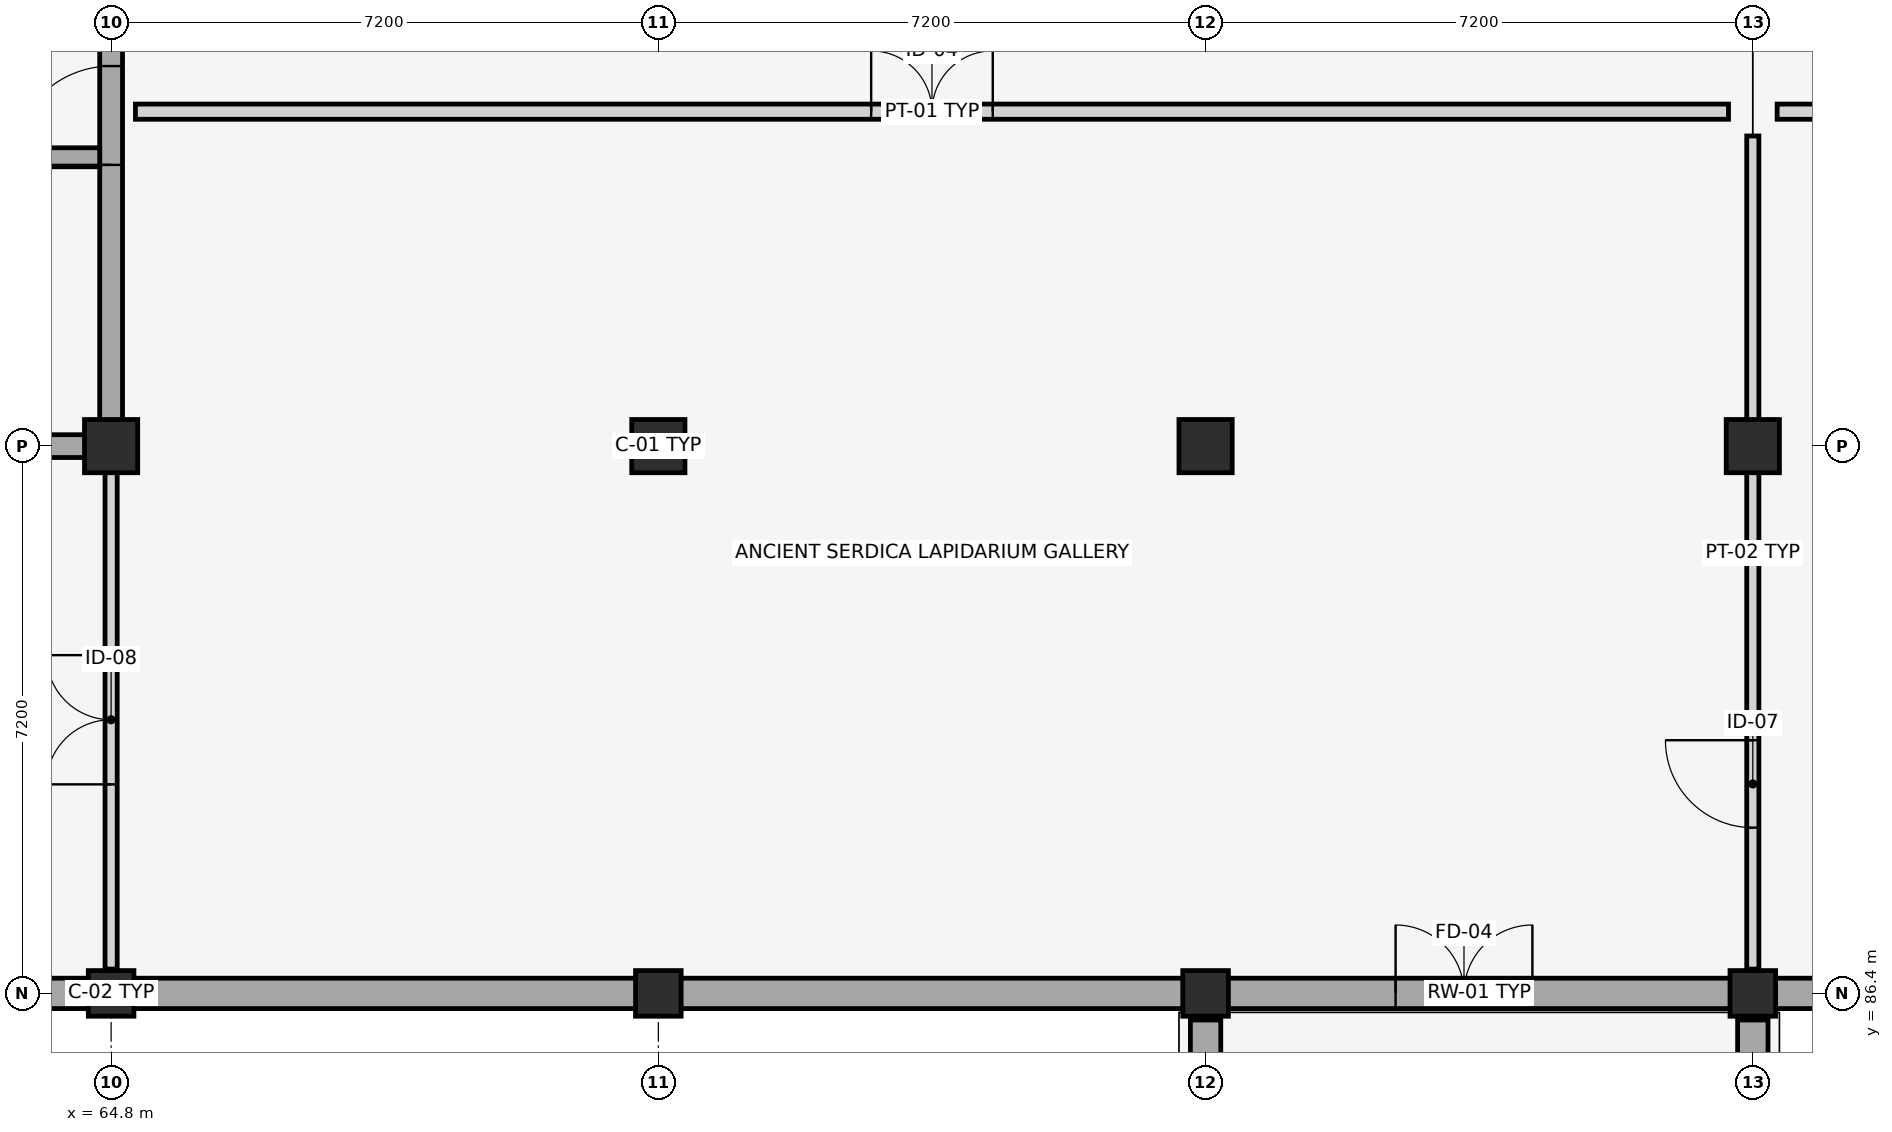
"""IFC4 building model, lengths in metres.
Left out: names, types, materials, properties, quantities, classifications, styles, units other than length and angle.
Written with IfcOpenShell. Run it as: python <this file> out.ifc"""

import sys

from ifc_helpers import new_model, si_unit, direction, frame, frame_2d, origin, origin_2d, place, context, subcontext, project, spatial, rectangle, extrude, element, fill, save


model = new_model("IFC4")
c1 = context("Model", 3, precision=1e-05, world=origin(), true_north=direction((0.0, 1.0)))
c2 = subcontext(c1, "Body", "Model", "MODEL_VIEW")
j1 = project(units=[si_unit("LENGTHUNIT", "METRE"), si_unit("PLANEANGLEUNIT", "RADIAN")], contexts=[c1])
p1 = place(None, origin())
s1 = spatial("IfcSite", under=j1, at=p1, CompositionType="ELEMENT")
p2 = place(p1, origin())
s2 = spatial("IfcBuilding", under=s1, at=p2, CompositionType="ELEMENT")
p3 = place(p2, frame((0.0, 0.0, -4.5)))
s3 = spatial("IfcBuildingStorey", under=s2, at=p3, CompositionType="ELEMENT", Elevation=-4.5)
p4 = place(p3, frame((57.4, 86.4, 0.0), z_axis=(0.0, 0.0, 1.0), x_axis=(1.0, 0.0, 0.0)))
e1 = element("IfcWall", 1, at=p4, inside=s3, PredefinedType="USERDEFINED", context=c2, shape_type="SweptSolid", body=[
    extrude(rectangle(XDim=50.8, YDim=0.4, at=frame_2d((25.4, 0.0))), origin(), (0.0, 0.0, 1.0), 3.67),
])
p5 = place(p4, frame((24.3, 0.0, 0.0)))
e2 = element("IfcOpeningElement", 2, at=p5, cuts=e1, PredefinedType="OPENING", context=c2, shape_type="SweptSolid", body=[
    extrude(rectangle(XDim=1.8, YDim=2.4, at=frame_2d((0.9, 1.2))), frame((0.0, 0.21, 0.0), z_axis=(0.0, -1.0, 0.0), x_axis=(1.0, 0.0, 0.0)), (0.0, 0.0, 1.0), 0.42),
])
p6 = place(p3, frame((64.8, 86.4, -0.45), z_axis=(0.0, 0.0, 1.0), x_axis=(0.0, 1.0, 0.0)))
e3 = element("IfcColumn", 3, at=p6, inside=s3, PredefinedType="COLUMN", context=c2, shape_type="SweptSolid", body=[
    extrude(rectangle(XDim=0.6, YDim=0.6, at=origin_2d()), origin(), (0.0, 0.0, 1.0), 4.95),
])
p7 = place(p3, frame((64.8, 93.6, -0.45), z_axis=(0.0, 0.0, 1.0), x_axis=(1.0, 0.0, 0.0)))
e4 = element("IfcColumn", 4, at=p7, inside=s3, PredefinedType="COLUMN", context=c2, shape_type="SweptSolid", body=[
    extrude(rectangle(XDim=0.7, YDim=0.7, at=origin_2d()), origin(), (0.0, 0.0, 1.0), 4.95),
])
p8 = place(p3, frame((72.0, 86.4, -0.45), z_axis=(0.0, 0.0, 1.0), x_axis=(1.0, 0.0, 0.0)))
e5 = element("IfcColumn", 5, at=p8, inside=s3, PredefinedType="COLUMN", context=c2, shape_type="SweptSolid", body=[
    extrude(rectangle(XDim=0.6, YDim=0.6, at=origin_2d()), origin(), (0.0, 0.0, 1.0), 4.95),
])
p9 = place(p3, frame((72.0, 93.6, -0.45), z_axis=(0.0, 0.0, 1.0), x_axis=(0.0, 1.0, 0.0)))
e6 = element("IfcColumn", 6, at=p9, inside=s3, PredefinedType="COLUMN", context=c2, shape_type="SweptSolid", body=[
    extrude(rectangle(XDim=0.7, YDim=0.7, at=origin_2d()), origin(), (0.0, 0.0, 1.0), 4.95),
])
p10 = place(p3, frame((79.2, 86.4, -0.45), z_axis=(0.0, 0.0, 1.0), x_axis=(0.0, 1.0, 0.0)))
e7 = element("IfcColumn", 7, at=p10, inside=s3, PredefinedType="COLUMN", context=c2, shape_type="SweptSolid", body=[
    extrude(rectangle(XDim=0.6, YDim=0.6, at=origin_2d()), origin(), (0.0, 0.0, 1.0), 4.95),
])
p11 = place(p3, frame((79.2, 93.6, -0.45), z_axis=(0.0, 0.0, 1.0), x_axis=(1.0, 0.0, 0.0)))
e8 = element("IfcColumn", 8, at=p11, inside=s3, PredefinedType="COLUMN", context=c2, shape_type="SweptSolid", body=[
    extrude(rectangle(XDim=0.7, YDim=0.7, at=origin_2d()), origin(), (0.0, 0.0, 1.0), 4.95),
])
p12 = place(p3, frame((86.4, 86.4, -0.45), z_axis=(0.0, 0.0, 1.0), x_axis=(1.0, 0.0, 0.0)))
e9 = element("IfcColumn", 9, at=p12, inside=s3, PredefinedType="COLUMN", context=c2, shape_type="SweptSolid", body=[
    extrude(rectangle(XDim=0.6, YDim=0.6, at=origin_2d()), origin(), (0.0, 0.0, 1.0), 4.95),
])
p13 = place(p3, frame((86.4, 93.6, -0.45), z_axis=(0.0, 0.0, 1.0), x_axis=(0.0, 1.0, 0.0)))
e10 = element("IfcColumn", 10, at=p13, inside=s3, PredefinedType="COLUMN", context=c2, shape_type="SweptSolid", body=[
    extrude(rectangle(XDim=0.7, YDim=0.7, at=origin_2d()), origin(), (0.0, 0.0, 1.0), 4.95),
])
for number, where, z_axis, x_axis in (
    (11, (79.2, 29.15, 0.0), (0.0, 0.0, 1.0), (0.0, 1.0, 0.0)),
    (12, (86.4, 29.15, 0.0), (0.0, 0.0, 1.0), (0.0, 1.0, 0.0)),
):
    element("IfcWall", number, at=place(p3, frame(where, z_axis=z_axis, x_axis=x_axis)), inside=s3, PredefinedType="USERDEFINED", context=c2, shape_type="SweptSolid", body=[
        extrude(rectangle(XDim=56.9, YDim=0.4, at=frame_2d((28.45, 0.0))), origin(), (0.0, 0.0, 1.0), 3.67),
    ])
p14 = place(p3, frame((57.8, 93.6, 0.0), z_axis=(0.0, 0.0, 1.0), x_axis=(1.0, 0.0, 0.0)))
e13 = element("IfcWall", 13, at=p14, inside=s3, PredefinedType="SHEAR", context=c2, shape_type="SweptSolid", body=[
    extrude(rectangle(XDim=7.15, YDim=0.3, at=frame_2d((3.575, 0.0))), origin(), (0.0, 0.0, 1.0), 4.25),
])
p15 = place(p3, frame((64.8, 93.75, 0.0), z_axis=(0.0, 0.0, 1.0), x_axis=(0.0, 1.0, 0.0)))
e14 = element("IfcWall", 14, at=p15, inside=s3, PredefinedType="SHEAR", context=c2, shape_type="SweptSolid", body=[
    extrude(rectangle(XDim=14.1, YDim=0.3, at=frame_2d((7.05, 0.0))), origin(), (0.0, 0.0, 1.0), 4.25),
])
p16 = place(p15, frame((3.55, 0.0, 0.0)))
e15 = element("IfcOpeningElement", 15, at=p16, cuts=e14, PredefinedType="OPENING", context=c2, shape_type="SweptSolid", body=[
    extrude(rectangle(XDim=1.3, YDim=2.2, at=frame_2d((0.65, 1.1))), frame((0.0, 0.16, 0.0), z_axis=(0.0, -1.0, 0.0), x_axis=(1.0, 0.0, 0.0)), (0.0, 0.0, 1.0), 0.32),
])
p17 = place(p15, frame((7.85, 0.0, 0.0)))
e16 = element("IfcOpeningElement", 16, at=p17, cuts=e14, PredefinedType="OPENING", context=c2, shape_type="SweptSolid", body=[
    extrude(rectangle(XDim=1.05, YDim=2.15, at=frame_2d((0.525, 1.075))), frame((0.0, 0.16, 0.0), z_axis=(0.0, -1.0, 0.0), x_axis=(1.0, 0.0, 0.0)), (0.0, 0.0, 1.0), 0.32),
])
p18 = place(p15, frame((10.55, 0.0, 0.0)))
e17 = element("IfcOpeningElement", 17, at=p18, cuts=e14, PredefinedType="OPENING", context=c2, shape_type="SweptSolid", body=[
    extrude(rectangle(XDim=1.0, YDim=2.15, at=frame_2d((0.5, 1.075))), frame((0.0, 0.16, 0.0), z_axis=(0.0, -1.0, 0.0), x_axis=(1.0, 0.0, 0.0)), (0.0, 0.0, 1.0), 0.32),
])
p19 = place(p3, frame((61.275, 97.4, 0.0), z_axis=(0.0, 0.0, 1.0), x_axis=(1.0, 0.0, 0.0)))
e18 = element("IfcWall", 18, at=p19, inside=s3, PredefinedType="SHEAR", context=c2, shape_type="SweptSolid", body=[
    extrude(rectangle(XDim=3.375, YDim=0.25, at=frame_2d((1.688, 0.0))), origin(), (0.0, 0.0, 1.0), 4.25),
])
p20 = place(p3, frame((65.12, 98.0, 0.0), z_axis=(0.0, 0.0, 1.0), x_axis=(1.0, 0.0, 0.0)))
e19 = element("IfcWall", 19, at=p20, inside=s3, PredefinedType="PARTITIONING", context=c2, shape_type="SweptSolid", body=[
    extrude(rectangle(XDim=20.96, YDim=0.2, at=frame_2d((10.48, 0.0))), origin(), (0.0, 0.0, 1.0), 3.45),
])
p21 = place(p20, frame((9.68, 0.0, 0.0)))
e20 = element("IfcOpeningElement", 20, at=p21, cuts=e19, PredefinedType="OPENING", context=c2, shape_type="SweptSolid", body=[
    extrude(rectangle(XDim=1.6, YDim=2.35, at=frame_2d((0.8, 1.175))), frame((0.0, 0.11, 0.0), z_axis=(0.0, -1.0, 0.0), x_axis=(1.0, 0.0, 0.0)), (0.0, 0.0, 1.0), 0.22),
])
p22 = place(p3, frame((86.72, 98.0, 0.0), z_axis=(0.0, 0.0, 1.0), x_axis=(1.0, 0.0, 0.0)))
e21 = element("IfcWall", 21, at=p22, inside=s3, PredefinedType="PARTITIONING", context=c2, shape_type="SweptSolid", body=[
    extrude(rectangle(XDim=13.76, YDim=0.2, at=frame_2d((6.88, 0.0))), origin(), (0.0, 0.0, 1.0), 3.45),
])
p23 = place(p22, frame((1.702, 0.0, 0.0)))
e22 = element("IfcOpeningElement", 22, at=p23, cuts=e21, PredefinedType="OPENING", context=c2, shape_type="SweptSolid", body=[
    extrude(rectangle(XDim=1.6, YDim=2.35, at=frame_2d((0.8, 1.175))), frame((0.0, 0.11, 0.0), z_axis=(0.0, -1.0, 0.0), x_axis=(1.0, 0.0, 0.0)), (0.0, 0.0, 1.0), 0.22),
])
p24 = place(p3, frame((86.4, 86.72, 0.0), z_axis=(0.0, 0.0, 1.0), x_axis=(0.0, 1.0, 0.0)))
e23 = element("IfcWall", 23, at=p24, inside=s3, PredefinedType="PARTITIONING", context=c2, shape_type="SweptSolid", body=[
    extrude(rectangle(XDim=10.96, YDim=0.16, at=frame_2d((5.48, 0.0))), origin(), (0.0, 0.0, 1.0), 3.45),
])
p25 = place(p24, frame((1.861, 0.0, 0.0)))
e24 = element("IfcOpeningElement", 24, at=p25, cuts=e23, PredefinedType="OPENING", context=c2, shape_type="SweptSolid", body=[
    extrude(rectangle(XDim=1.15, YDim=2.2, at=frame_2d((0.575, 1.1))), frame((0.0, 0.09, 0.0), z_axis=(0.0, -1.0, 0.0), x_axis=(1.0, 0.0, 0.0)), (0.0, 0.0, 1.0), 0.18),
])
p26 = place(p3, frame((64.8, 86.72, 0.0), z_axis=(0.0, 0.0, 1.0), x_axis=(0.0, 1.0, 0.0)))
e25 = element("IfcWall", 25, at=p26, inside=s3, PredefinedType="PARTITIONING", context=c2, shape_type="SweptSolid", body=[
    extrude(rectangle(XDim=6.56, YDim=0.16, at=frame_2d((3.28, 0.0))), origin(), (0.0, 0.0, 1.0), 3.45),
])
p27 = place(p26, frame((2.43, 0.0, 0.0)))
e26 = element("IfcOpeningElement", 26, at=p27, cuts=e25, PredefinedType="OPENING", context=c2, shape_type="SweptSolid", body=[
    extrude(rectangle(XDim=1.7, YDim=2.4, at=frame_2d((0.85, 1.2))), frame((0.0, 0.09, 0.0), z_axis=(0.0, -1.0, 0.0), x_axis=(1.0, 0.0, 0.0)), (0.0, 0.0, 1.0), 0.18),
])
p28 = place(p16, origin())
e27 = element("IfcDoor", 27, at=p28, inside=s3, OperationType="SINGLE_SWING_LEFT", PredefinedType="DOOR", context=c2, shape_type="SweptSolid", body=[
    extrude(rectangle(XDim=1.3, YDim=2.2, at=frame_2d((0.65, 1.1))), frame((0.0, 0.025, 0.0), z_axis=(0.0, -1.0, 0.0), x_axis=(1.0, 0.0, 0.0)), (0.0, 0.0, 1.0), 0.05),
])
fill(e15, e27)
p29 = place(p21, origin())
e28 = element("IfcDoor", 28, at=p29, inside=s3, OperationType="DOUBLE_DOOR_SINGLE_SWING", PredefinedType="DOOR", context=c2, shape_type="SweptSolid", body=[
    extrude(rectangle(XDim=1.6, YDim=2.35, at=frame_2d((0.8, 1.175))), frame((0.0, 0.025, 0.0), z_axis=(0.0, -1.0, 0.0), x_axis=(1.0, 0.0, 0.0)), (0.0, 0.0, 1.0), 0.05),
])
fill(e20, e28)
p30 = place(p25, origin())
e29 = element("IfcDoor", 29, at=p30, inside=s3, OperationType="SINGLE_SWING_RIGHT", PredefinedType="DOOR", context=c2, shape_type="SweptSolid", body=[
    extrude(rectangle(XDim=1.15, YDim=2.2, at=frame_2d((0.575, 1.1))), frame((0.0, 0.025, 0.0), z_axis=(0.0, -1.0, 0.0), x_axis=(1.0, 0.0, 0.0)), (0.0, 0.0, 1.0), 0.05),
])
fill(e24, e29)
p31 = place(p27, origin())
e30 = element("IfcDoor", 30, at=p31, inside=s3, OperationType="DOUBLE_DOOR_SINGLE_SWING", PredefinedType="DOOR", context=c2, shape_type="SweptSolid", body=[
    extrude(rectangle(XDim=1.7, YDim=2.4, at=frame_2d((0.85, 1.2))), frame((0.0, 0.025, 0.0), z_axis=(0.0, -1.0, 0.0), x_axis=(1.0, 0.0, 0.0)), (0.0, 0.0, 1.0), 0.05),
])
fill(e26, e30)
p32 = place(p5, origin())
e31 = element("IfcDoor", 31, at=p32, inside=s3, OperationType="DOUBLE_DOOR_SINGLE_SWING", PredefinedType="DOOR", context=c2, shape_type="SweptSolid", body=[
    extrude(rectangle(XDim=1.8, YDim=2.4, at=frame_2d((0.9, 1.2))), frame((0.0, 0.025, 0.0), z_axis=(0.0, -1.0, 0.0), x_axis=(1.0, 0.0, 0.0)), (0.0, 0.0, 1.0), 0.05),
])
fill(e2, e31)
save(model, sys.argv[1])
